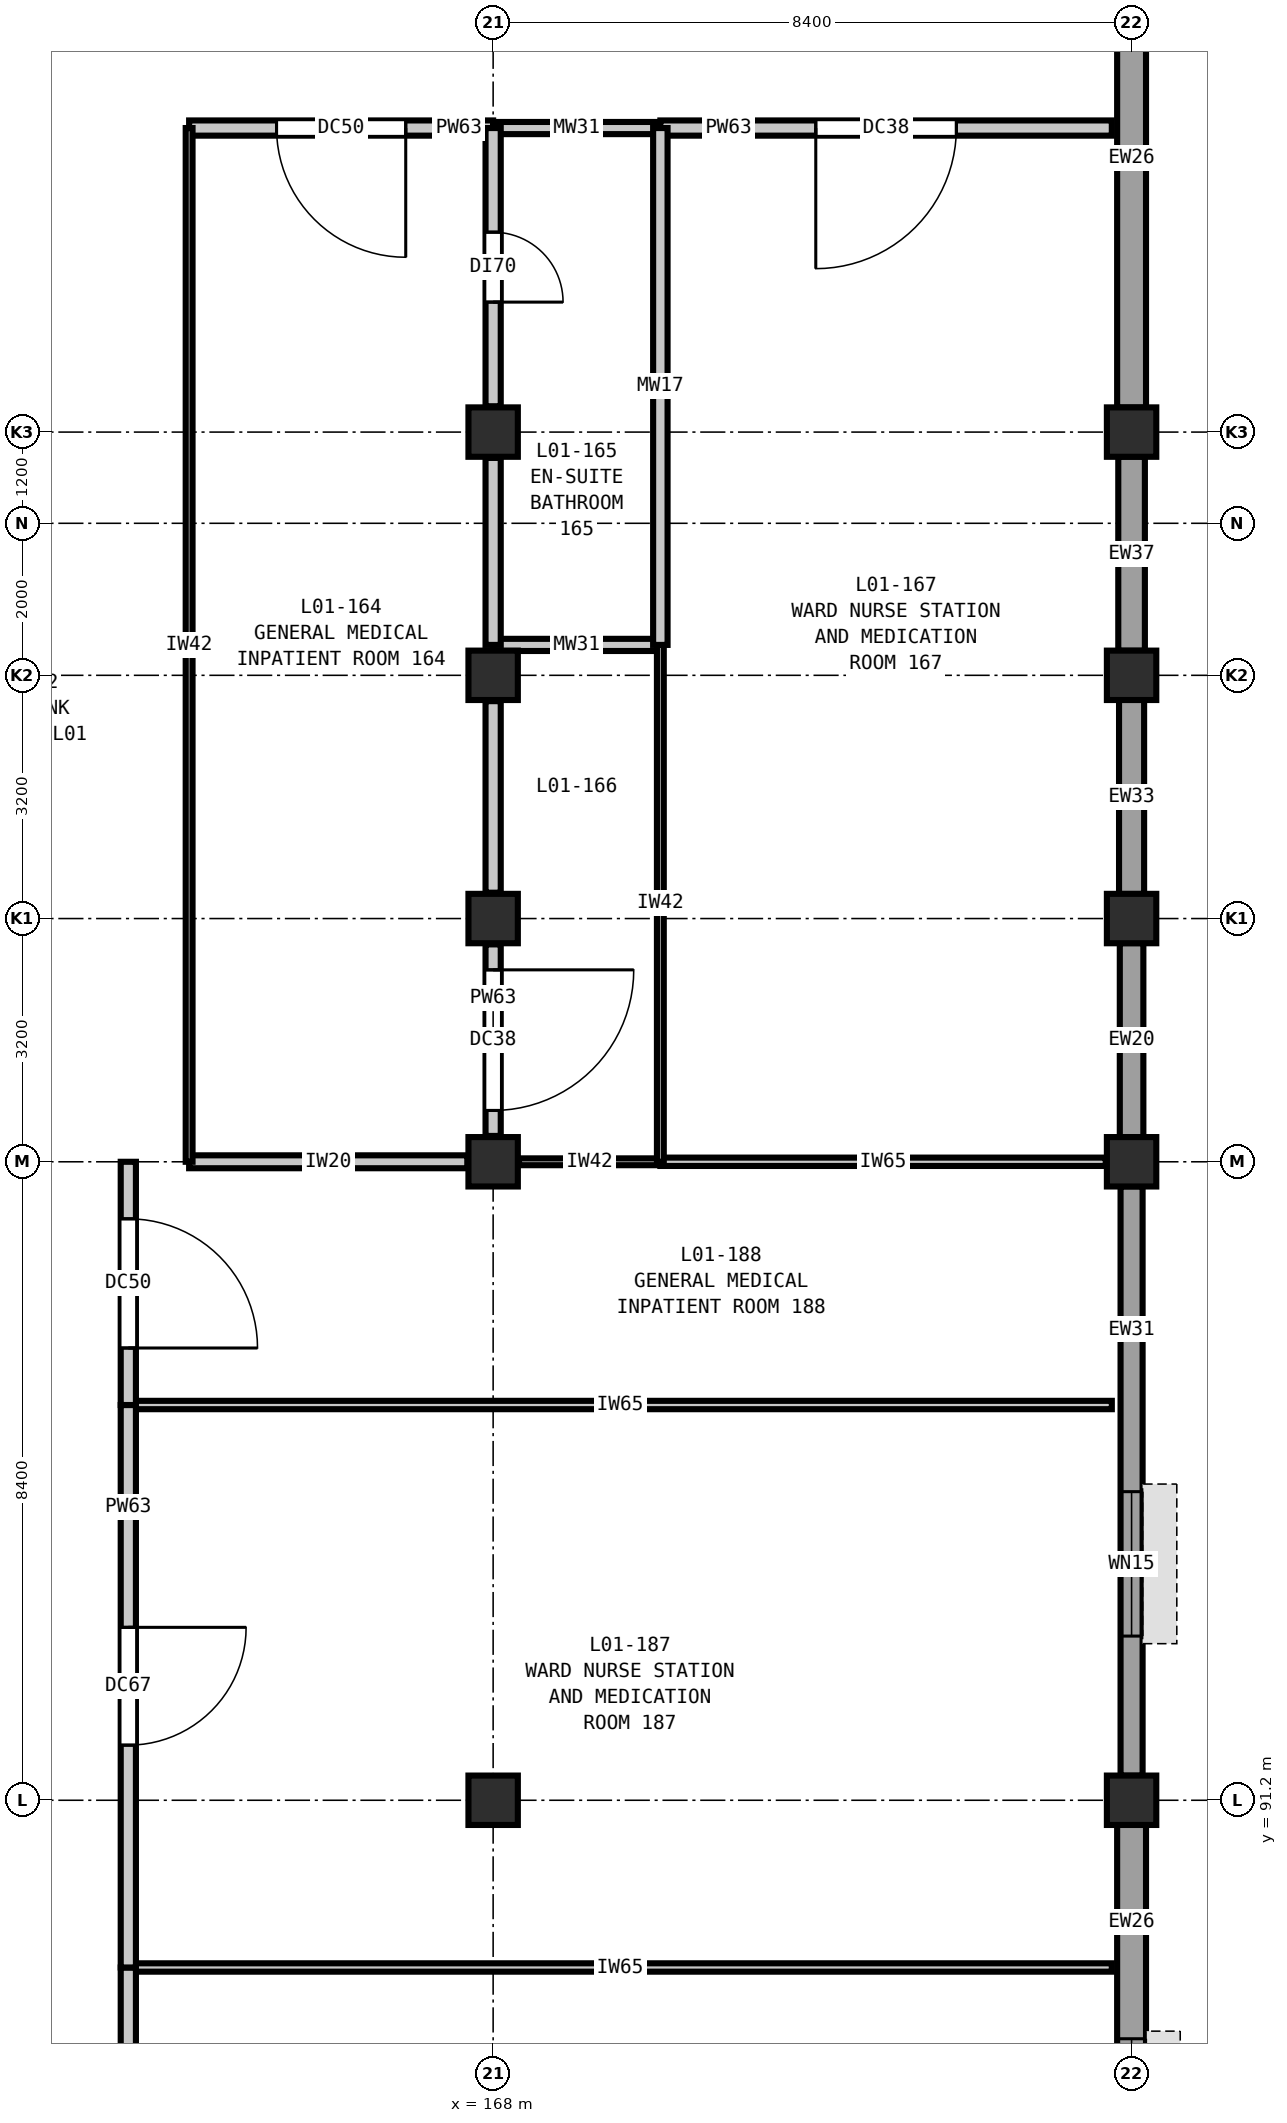
"""IFC4 building model, lengths in metres.
Left out: names, types, materials, properties, quantities, classifications, styles, units other than length and angle.
Written with IfcOpenShell. Run it as: python <this file> out.ifc"""

import sys

from ifc_helpers import new_model, si_unit, direction, frame, frame_2d, origin, origin_2d, place, context, subcontext, project, spatial, rectangle, extrude, element, fill, save


model = new_model("IFC4")
c1 = context("Model", 3, precision=1e-05, world=origin(), true_north=direction((0.0, 1.0)))
c2 = subcontext(c1, "Body", "Model", "MODEL_VIEW")
j1 = project(units=[si_unit("LENGTHUNIT", "METRE"), si_unit("PLANEANGLEUNIT", "RADIAN")], contexts=[c1])
p1 = place(None, origin())
s1 = spatial("IfcSite", under=j1, at=p1, CompositionType="ELEMENT")
p2 = place(p1, origin())
s2 = spatial("IfcBuilding", under=s1, at=p2, CompositionType="ELEMENT")
p3 = place(p2, frame((0.0, 0.0, 5.4)))
s3 = spatial("IfcBuildingStorey", under=s2, at=p3, CompositionType="ELEMENT", Elevation=5.4)
for number, where, z_axis, x_axis in (
    (1, (168.0, 91.2, 0.0), (0.0, 0.0, 1.0), (1.0, 0.0, 0.0)),
    (2, (168.0, 99.6, 0.0), (0.0, 0.0, 1.0), (1.0, 0.0, 0.0)),
    (3, (168.0, 102.8, 0.0), (0.0, 0.0, 1.0), (1.0, 0.0, 0.0)),
    (4, (168.0, 106.0, 0.0), (0.0, 0.0, 1.0), (1.0, 0.0, 0.0)),
    (5, (168.0, 109.2, 0.0), (0.0, 0.0, 1.0), (1.0, 0.0, 0.0)),
    (6, (176.4, 91.2, 0.0), (0.0, 0.0, 1.0), (1.0, 0.0, 0.0)),
    (7, (176.4, 99.6, 0.0), (0.0, 0.0, 1.0), (1.0, 0.0, 0.0)),
    (8, (176.4, 102.8, 0.0), (0.0, 0.0, 1.0), (1.0, 0.0, 0.0)),
    (9, (176.4, 106.0, 0.0), (0.0, 0.0, 1.0), (1.0, 0.0, 0.0)),
    (10, (176.4, 109.2, 0.0), (0.0, 0.0, 1.0), (1.0, 0.0, 0.0)),
):
    element("IfcColumn", number, at=place(p3, frame(where, z_axis=z_axis, x_axis=x_axis)), inside=s3, PredefinedType="COLUMN", context=c2, shape_type="SweptSolid", body=[
        extrude(rectangle(XDim=0.65, YDim=0.65, at=origin_2d()), origin(), (0.0, 0.0, 1.0), 5.4),
    ])
p4 = place(p3, frame((176.4, 116.077, 0.0), z_axis=(0.0, 0.0, 1.0), x_axis=(0.0, -1.0, 0.0)))
e11 = element("IfcWall", 11, at=p4, inside=s3, PredefinedType="SOLIDWALL", context=c2, shape_type="SweptSolid", body=[
    extrude(rectangle(XDim=6.554, YDim=0.38, at=frame_2d((3.277, 0.0))), origin(), (0.0, 0.0, 1.0), 4.68),
])
p5 = place(p3, frame((176.4, 108.877, 0.0), z_axis=(0.0, 0.0, 1.0), x_axis=(0.0, -1.0, 0.0)))
e12 = element("IfcWall", 12, at=p5, inside=s3, PredefinedType="SOLIDWALL", context=c2, shape_type="SweptSolid", body=[
    extrude(rectangle(XDim=2.554, YDim=0.35, at=frame_2d((1.277, 0.0))), origin(), (0.0, 0.0, 1.0), 4.68),
])
p6 = place(p3, frame((176.4, 105.677, 0.0), z_axis=(0.0, 0.0, 1.0), x_axis=(0.0, -1.0, 0.0)))
e13 = element("IfcWall", 13, at=p6, inside=s3, PredefinedType="SOLIDWALL", context=c2, shape_type="SweptSolid", body=[
    extrude(rectangle(XDim=2.554, YDim=0.33, at=frame_2d((1.277, 0.0))), origin(), (0.0, 0.0, 1.0), 4.68),
])
p7 = place(p3, frame((176.4, 102.477, 0.0), z_axis=(0.0, 0.0, 1.0), x_axis=(0.0, -1.0, 0.0)))
e14 = element("IfcWall", 14, at=p7, inside=s3, PredefinedType="SOLIDWALL", context=c2, shape_type="SweptSolid", body=[
    extrude(rectangle(XDim=2.554, YDim=0.31, at=frame_2d((1.277, 0.0))), origin(), (0.0, 0.0, 1.0), 4.68),
])
p8 = place(p3, frame((176.4, 99.277, 0.0), z_axis=(0.0, 0.0, 1.0), x_axis=(0.0, -1.0, 0.0)))
e15 = element("IfcWall", 15, at=p8, inside=s3, PredefinedType="SOLIDWALL", context=c2, shape_type="SweptSolid", body=[
    extrude(rectangle(XDim=7.754, YDim=0.29, at=frame_2d((3.877, 0.0))), origin(), (0.0, 0.0, 1.0), 4.68),
])
p9 = place(p8, frame((4.017, 0.0, 0.9)))
e16 = element("IfcOpeningElement", 16, at=p9, cuts=e15, PredefinedType="OPENING", context=c2, shape_type="SweptSolid", body=[
    extrude(rectangle(XDim=1.9, YDim=2.15, at=frame_2d((0.95, 1.075))), frame((0.0, 0.155, 0.0), z_axis=(0.0, -1.0, 0.0), x_axis=(1.0, 0.0, 0.0)), (0.0, 0.0, 1.0), 0.31),
])
p10 = place(p3, frame((176.4, 90.877, 0.0), z_axis=(0.0, 0.0, 1.0), x_axis=(0.0, -1.0, 0.0)))
e17 = element("IfcWall", 17, at=p10, inside=s3, PredefinedType="SOLIDWALL", context=c2, shape_type="SweptSolid", body=[
    extrude(rectangle(XDim=7.779, YDim=0.38, at=frame_2d((3.89, 0.0))), origin(), (0.0, 0.0, 1.0), 4.68),
])
p11 = place(p10, frame((2.814, 0.0, 0.9)))
e18 = element("IfcOpeningElement", 18, at=p11, cuts=e17, PredefinedType="OPENING", context=c2, shape_type="SweptSolid", body=[
    extrude(rectangle(XDim=2.15, YDim=2.15, at=frame_2d((1.075, 1.075))), frame((0.0, 0.2, 0.0), z_axis=(0.0, -1.0, 0.0), x_axis=(1.0, 0.0, 0.0)), (0.0, 0.0, 1.0), 0.4),
])
for number, where, z_axis, x_axis in (
    (19, (163.2, 89.0, 0.0), (0.0, 0.0, 1.0), (1.0, 0.0, 0.0)),
    (20, (163.2, 96.4, 0.0), (0.0, 0.0, 1.0), (1.0, 0.0, 0.0)),
):
    element("IfcWall", number, at=place(p3, frame(where, z_axis=z_axis, x_axis=x_axis)), inside=s3, PredefinedType="PARTITIONING", context=c2, shape_type="SweptSolid", body=[
        extrude(rectangle(XDim=12.94, YDim=0.11, at=frame_2d((6.47, 0.0))), origin(), (0.0, 0.0, 1.0), 5.05),
    ])
p12 = place(p3, frame((164.0, 99.6, 0.0), z_axis=(0.0, 0.0, 1.0), x_axis=(1.0, 0.0, 0.0)))
e21 = element("IfcWall", 21, at=p12, inside=s3, PredefinedType="PARTITIONING", context=c2, shape_type="SweptSolid", body=[
    extrude(rectangle(XDim=3.66, YDim=0.17, at=frame_2d((1.83, 0.0))), origin(), (0.0, 0.0, 1.0), 4.685),
])
p13 = place(p3, frame((168.34, 99.6, 0.0), z_axis=(0.0, 0.0, 1.0), x_axis=(1.0, 0.0, 0.0)))
e22 = element("IfcWall", 22, at=p13, inside=s3, PredefinedType="PARTITIONING", context=c2, shape_type="SweptSolid", body=[
    extrude(rectangle(XDim=1.86, YDim=0.09, at=frame_2d((0.93, 0.0))), origin(), (0.0, 0.0, 1.0), 4.685),
])
p14 = place(p3, frame((170.2, 99.6, 0.0), z_axis=(0.0, 0.0, 1.0), x_axis=(1.0, 0.0, 0.0)))
e23 = element("IfcWall", 23, at=p14, inside=s3, PredefinedType="PARTITIONING", context=c2, shape_type="SweptSolid", body=[
    extrude(rectangle(XDim=5.86, YDim=0.11, at=frame_2d((2.93, 0.0))), origin(), (0.0, 0.0, 1.0), 4.685),
])
p15 = place(p3, frame((168.0, 106.4, 0.0), z_axis=(0.0, 0.0, 1.0), x_axis=(1.0, 0.0, 0.0)))
e24 = element("IfcWall", 24, at=p15, inside=s3, PredefinedType="PLUMBINGWALL", context=c2, shape_type="SweptSolid", body=[
    extrude(rectangle(XDim=2.2, YDim=0.16, at=frame_2d((1.1, 0.0))), origin(), (0.0, 0.0, 1.0), 5.05),
])
p16 = place(p3, frame((164.0, 113.2, 0.0), z_axis=(0.0, 0.0, 1.0), x_axis=(1.0, 0.0, 0.0)))
e25 = element("IfcWall", 25, at=p16, inside=s3, PredefinedType="PARTITIONING", context=c2, shape_type="SweptSolid", body=[
    extrude(rectangle(XDim=4.0, YDim=0.2, at=frame_2d((2.0, 0.0))), origin(), (0.0, 0.0, 1.0), 5.05),
])
p17 = place(p16, frame((1.15, 0.0, 0.0)))
e26 = element("IfcOpeningElement", 26, at=p17, cuts=e25, PredefinedType="OPENING", context=c2, shape_type="SweptSolid", body=[
    extrude(rectangle(XDim=1.7, YDim=2.3, at=frame_2d((0.85, 1.15))), frame((0.0, 0.11, 0.0), z_axis=(0.0, -1.0, 0.0), x_axis=(1.0, 0.0, 0.0)), (0.0, 0.0, 1.0), 0.22),
])
p18 = place(p3, frame((168.0, 113.2, 0.0), z_axis=(0.0, 0.0, 1.0), x_axis=(1.0, 0.0, 0.0)))
e27 = element("IfcWall", 27, at=p18, inside=s3, PredefinedType="PLUMBINGWALL", context=c2, shape_type="SweptSolid", body=[
    extrude(rectangle(XDim=2.2, YDim=0.16, at=frame_2d((1.1, 0.0))), origin(), (0.0, 0.0, 1.0), 5.05),
])
p19 = place(p3, frame((170.2, 113.2, 0.0), z_axis=(0.0, 0.0, 1.0), x_axis=(1.0, 0.0, 0.0)))
e28 = element("IfcWall", 28, at=p19, inside=s3, PredefinedType="PARTITIONING", context=c2, shape_type="SweptSolid", body=[
    extrude(rectangle(XDim=5.94, YDim=0.2, at=frame_2d((2.97, 0.0))), origin(), (0.0, 0.0, 1.0), 5.05),
])
p20 = place(p19, frame((2.045, 0.0, 0.0)))
e29 = element("IfcOpeningElement", 29, at=p20, cuts=e28, PredefinedType="OPENING", context=c2, shape_type="SweptSolid", body=[
    extrude(rectangle(XDim=1.85, YDim=2.3, at=frame_2d((0.925, 1.15))), frame((0.0, 0.11, 0.0), z_axis=(0.0, -1.0, 0.0), x_axis=(1.0, 0.0, 0.0)), (0.0, 0.0, 1.0), 0.22),
])
p21 = place(p3, frame((163.2, 82.8, 0.0), z_axis=(0.0, 0.0, 1.0), x_axis=(0.0, 1.0, 0.0)))
e30 = element("IfcWall", 30, at=p21, inside=s3, PredefinedType="PARTITIONING", context=c2, shape_type="SweptSolid", body=[
    extrude(rectangle(XDim=6.2, YDim=0.2, at=frame_2d((3.1, 0.0))), origin(), (0.0, 0.0, 1.0), 5.05),
])
p22 = place(p21, frame((2.375, 0.0, 0.0)))
e31 = element("IfcOpeningElement", 31, at=p22, cuts=e30, PredefinedType="OPENING", context=c2, shape_type="SweptSolid", body=[
    extrude(rectangle(XDim=1.45, YDim=2.25, at=frame_2d((0.725, 1.125))), frame((0.0, 0.11, 0.0), z_axis=(0.0, -1.0, 0.0), x_axis=(1.0, 0.0, 0.0)), (0.0, 0.0, 1.0), 0.22),
])
p23 = place(p3, frame((163.2, 89.0, 0.0), z_axis=(0.0, 0.0, 1.0), x_axis=(0.0, 1.0, 0.0)))
e32 = element("IfcWall", 32, at=p23, inside=s3, PredefinedType="PARTITIONING", context=c2, shape_type="SweptSolid", body=[
    extrude(rectangle(XDim=7.4, YDim=0.2, at=frame_2d((3.7, 0.0))), origin(), (0.0, 0.0, 1.0), 5.05),
])
p24 = place(p23, frame((2.925, 0.0, 0.0)))
e33 = element("IfcOpeningElement", 33, at=p24, cuts=e32, PredefinedType="OPENING", context=c2, shape_type="SweptSolid", body=[
    extrude(rectangle(XDim=1.55, YDim=2.25, at=frame_2d((0.775, 1.125))), frame((0.0, 0.11, 0.0), z_axis=(0.0, -1.0, 0.0), x_axis=(1.0, 0.0, 0.0)), (0.0, 0.0, 1.0), 0.22),
])
p25 = place(p3, frame((163.2, 96.4, 0.0), z_axis=(0.0, 0.0, 1.0), x_axis=(0.0, 1.0, 0.0)))
e34 = element("IfcWall", 34, at=p25, inside=s3, PredefinedType="PARTITIONING", context=c2, shape_type="SweptSolid", body=[
    extrude(rectangle(XDim=3.2, YDim=0.2, at=frame_2d((1.6, 0.0))), origin(), (0.0, 0.0, 1.0), 5.05),
])
p26 = place(p25, frame((0.75, 0.0, 0.0)))
e35 = element("IfcOpeningElement", 35, at=p26, cuts=e34, PredefinedType="OPENING", context=c2, shape_type="SweptSolid", body=[
    extrude(rectangle(XDim=1.7, YDim=2.3, at=frame_2d((0.85, 1.15))), frame((0.0, 0.11, 0.0), z_axis=(0.0, -1.0, 0.0), x_axis=(1.0, 0.0, 0.0)), (0.0, 0.0, 1.0), 0.22),
])
p27 = place(p3, frame((164.0, 99.6, 0.0), z_axis=(0.0, 0.0, 1.0), x_axis=(0.0, 1.0, 0.0)))
e36 = element("IfcWall", 36, at=p27, inside=s3, PredefinedType="PARTITIONING", context=c2, shape_type="SweptSolid", body=[
    extrude(rectangle(XDim=13.6, YDim=0.09, at=frame_2d((6.8, 0.0))), origin(), (0.0, 0.0, 1.0), 5.05),
])
p28 = place(p3, frame((168.0, 99.94, 0.0), z_axis=(0.0, 0.0, 1.0), x_axis=(0.0, 1.0, 0.0)))
e37 = element("IfcWall", 37, at=p28, inside=s3, PredefinedType="PARTITIONING", context=c2, shape_type="SweptSolid", body=[
    extrude(rectangle(XDim=2.52, YDim=0.2, at=frame_2d((1.26, 0.0))), origin(), (0.0, 0.0, 1.0), 4.735),
])
p29 = place(p28, frame((0.335, 0.0, 0.0)))
e38 = element("IfcOpeningElement", 38, at=p29, cuts=e37, PredefinedType="OPENING", context=c2, shape_type="SweptSolid", body=[
    extrude(rectangle(XDim=1.85, YDim=2.3, at=frame_2d((0.925, 1.15))), frame((0.0, 0.11, 0.0), z_axis=(0.0, -1.0, 0.0), x_axis=(1.0, 0.0, 0.0)), (0.0, 0.0, 1.0), 0.22),
])
p30 = place(p3, frame((168.0, 103.14, 0.0), z_axis=(0.0, 0.0, 1.0), x_axis=(0.0, 1.0, 0.0)))
e39 = element("IfcWall", 39, at=p30, inside=s3, PredefinedType="PARTITIONING", context=c2, shape_type="SweptSolid", body=[
    extrude(rectangle(XDim=2.52, YDim=0.2, at=frame_2d((1.26, 0.0))), origin(), (0.0, 0.0, 1.0), 4.735),
])
p31 = place(p3, frame((168.0, 109.54, 0.0), z_axis=(0.0, 0.0, 1.0), x_axis=(0.0, 1.0, 0.0)))
e40 = element("IfcWall", 40, at=p31, inside=s3, PredefinedType="PARTITIONING", context=c2, shape_type="SweptSolid", body=[
    extrude(rectangle(XDim=3.66, YDim=0.2, at=frame_2d((1.83, 0.0))), origin(), (0.0, 0.0, 1.0), 4.735),
])
p32 = place(p31, frame((1.37, 0.0, 0.0)))
e41 = element("IfcOpeningElement", 41, at=p32, cuts=e40, PredefinedType="OPENING", context=c2, shape_type="SweptSolid", body=[
    extrude(rectangle(XDim=0.92, YDim=2.1, at=frame_2d((0.46, 1.05))), frame((0.0, 0.11, 0.0), z_axis=(0.0, -1.0, 0.0), x_axis=(1.0, 0.0, 0.0)), (0.0, 0.0, 1.0), 0.22),
])
p33 = place(p3, frame((168.0, 106.4, 0.0), z_axis=(0.0, 0.0, 1.0), x_axis=(0.0, 1.0, 0.0)))
e42 = element("IfcWall", 42, at=p33, inside=s3, PredefinedType="PARTITIONING", context=c2, shape_type="SweptSolid", body=[
    extrude(rectangle(XDim=2.46, YDim=0.2, at=frame_2d((1.23, 0.0))), origin(), (0.0, 0.0, 1.0), 4.735),
])
p34 = place(p3, frame((170.2, 99.6, 0.0), z_axis=(0.0, 0.0, 1.0), x_axis=(0.0, 1.0, 0.0)))
e43 = element("IfcWall", 43, at=p34, inside=s3, PredefinedType="PARTITIONING", context=c2, shape_type="SweptSolid", body=[
    extrude(rectangle(XDim=6.8, YDim=0.09, at=frame_2d((3.4, 0.0))), origin(), (0.0, 0.0, 1.0), 5.05),
])
p35 = place(p3, frame((170.2, 106.4, 0.0), z_axis=(0.0, 0.0, 1.0), x_axis=(0.0, 1.0, 0.0)))
e44 = element("IfcWall", 44, at=p35, inside=s3, PredefinedType="PLUMBINGWALL", context=c2, shape_type="SweptSolid", body=[
    extrude(rectangle(XDim=6.8, YDim=0.19, at=frame_2d((3.4, 0.0))), origin(), (0.0, 0.0, 1.0), 5.05),
])
p36 = place(p9, origin())
e45 = element("IfcWindow", 45, at=p36, inside=s3, PartitioningType="DOUBLE_PANEL_VERTICAL", PredefinedType="WINDOW", context=c2, shape_type="SweptSolid", body=[
    extrude(rectangle(XDim=1.9, YDim=2.15, at=frame_2d((0.95, 1.075))), frame((0.0, 0.03, 0.0), z_axis=(0.0, -1.0, 0.0), x_axis=(1.0, 0.0, 0.0)), (0.0, 0.0, 1.0), 0.06),
])
fill(e16, e45)
p37 = place(p11, origin())
e46 = element("IfcWindow", 46, at=p37, inside=s3, PartitioningType="DOUBLE_PANEL_VERTICAL", PredefinedType="WINDOW", context=c2, shape_type="SweptSolid", body=[
    extrude(rectangle(XDim=2.15, YDim=2.15, at=frame_2d((1.075, 1.075))), frame((0.0, 0.03, 0.0), z_axis=(0.0, -1.0, 0.0), x_axis=(1.0, 0.0, 0.0)), (0.0, 0.0, 1.0), 0.06),
])
fill(e18, e46)
p38 = place(p17, frame((1.7, 0.0, 0.0), z_axis=(0.0, 0.0, 1.0), x_axis=(-1.0, 0.0, 0.0)))
e47 = element("IfcDoor", 47, at=p38, inside=s3, OperationType="SINGLE_SWING_LEFT", PredefinedType="DOOR", context=c2, shape_type="SweptSolid", body=[
    extrude(rectangle(XDim=1.7, YDim=2.3, at=frame_2d((0.85, 1.15))), frame((0.0, 0.025, 0.0), z_axis=(0.0, -1.0, 0.0), x_axis=(1.0, 0.0, 0.0)), (0.0, 0.0, 1.0), 0.05),
])
fill(e26, e47)
p39 = place(p20, frame((1.85, 0.0, 0.0), z_axis=(0.0, 0.0, 1.0), x_axis=(-1.0, 0.0, 0.0)))
e48 = element("IfcDoor", 48, at=p39, inside=s3, OperationType="SINGLE_SWING_RIGHT", PredefinedType="DOOR", context=c2, shape_type="SweptSolid", body=[
    extrude(rectangle(XDim=1.85, YDim=2.3, at=frame_2d((0.925, 1.15))), frame((0.0, 0.025, 0.0), z_axis=(0.0, -1.0, 0.0), x_axis=(1.0, 0.0, 0.0)), (0.0, 0.0, 1.0), 0.05),
])
fill(e29, e48)
p40 = place(p24, frame((1.55, 0.0, 0.0), z_axis=(0.0, 0.0, 1.0), x_axis=(-1.0, 0.0, 0.0)))
e49 = element("IfcDoor", 49, at=p40, inside=s3, OperationType="SINGLE_SWING_LEFT", PredefinedType="DOOR", context=c2, shape_type="SweptSolid", body=[
    extrude(rectangle(XDim=1.55, YDim=2.25, at=frame_2d((0.775, 1.125))), frame((0.0, 0.025, 0.0), z_axis=(0.0, -1.0, 0.0), x_axis=(1.0, 0.0, 0.0)), (0.0, 0.0, 1.0), 0.05),
])
fill(e33, e49)
p41 = place(p26, frame((1.7, 0.0, 0.0), z_axis=(0.0, 0.0, 1.0), x_axis=(-1.0, 0.0, 0.0)))
e50 = element("IfcDoor", 50, at=p41, inside=s3, OperationType="SINGLE_SWING_RIGHT", PredefinedType="DOOR", context=c2, shape_type="SweptSolid", body=[
    extrude(rectangle(XDim=1.7, YDim=2.3, at=frame_2d((0.85, 1.15))), frame((0.0, 0.025, 0.0), z_axis=(0.0, -1.0, 0.0), x_axis=(1.0, 0.0, 0.0)), (0.0, 0.0, 1.0), 0.05),
])
fill(e35, e50)
p42 = place(p29, frame((1.85, 0.0, 0.0), z_axis=(0.0, 0.0, 1.0), x_axis=(-1.0, 0.0, 0.0)))
e51 = element("IfcDoor", 51, at=p42, inside=s3, OperationType="SINGLE_SWING_LEFT", PredefinedType="DOOR", context=c2, shape_type="SweptSolid", body=[
    extrude(rectangle(XDim=1.85, YDim=2.3, at=frame_2d((0.925, 1.15))), frame((0.0, 0.025, 0.0), z_axis=(0.0, -1.0, 0.0), x_axis=(1.0, 0.0, 0.0)), (0.0, 0.0, 1.0), 0.05),
])
fill(e38, e51)
p43 = place(p32, frame((0.92, 0.0, 0.0), z_axis=(0.0, 0.0, 1.0), x_axis=(-1.0, 0.0, 0.0)))
e52 = element("IfcDoor", 52, at=p43, inside=s3, OperationType="SINGLE_SWING_RIGHT", PredefinedType="DOOR", context=c2, shape_type="SweptSolid", body=[
    extrude(rectangle(XDim=0.92, YDim=2.1, at=frame_2d((0.46, 1.05))), frame((0.0, 0.025, 0.0), z_axis=(0.0, -1.0, 0.0), x_axis=(1.0, 0.0, 0.0)), (0.0, 0.0, 1.0), 0.05),
])
fill(e41, e52)
save(model, sys.argv[1])
